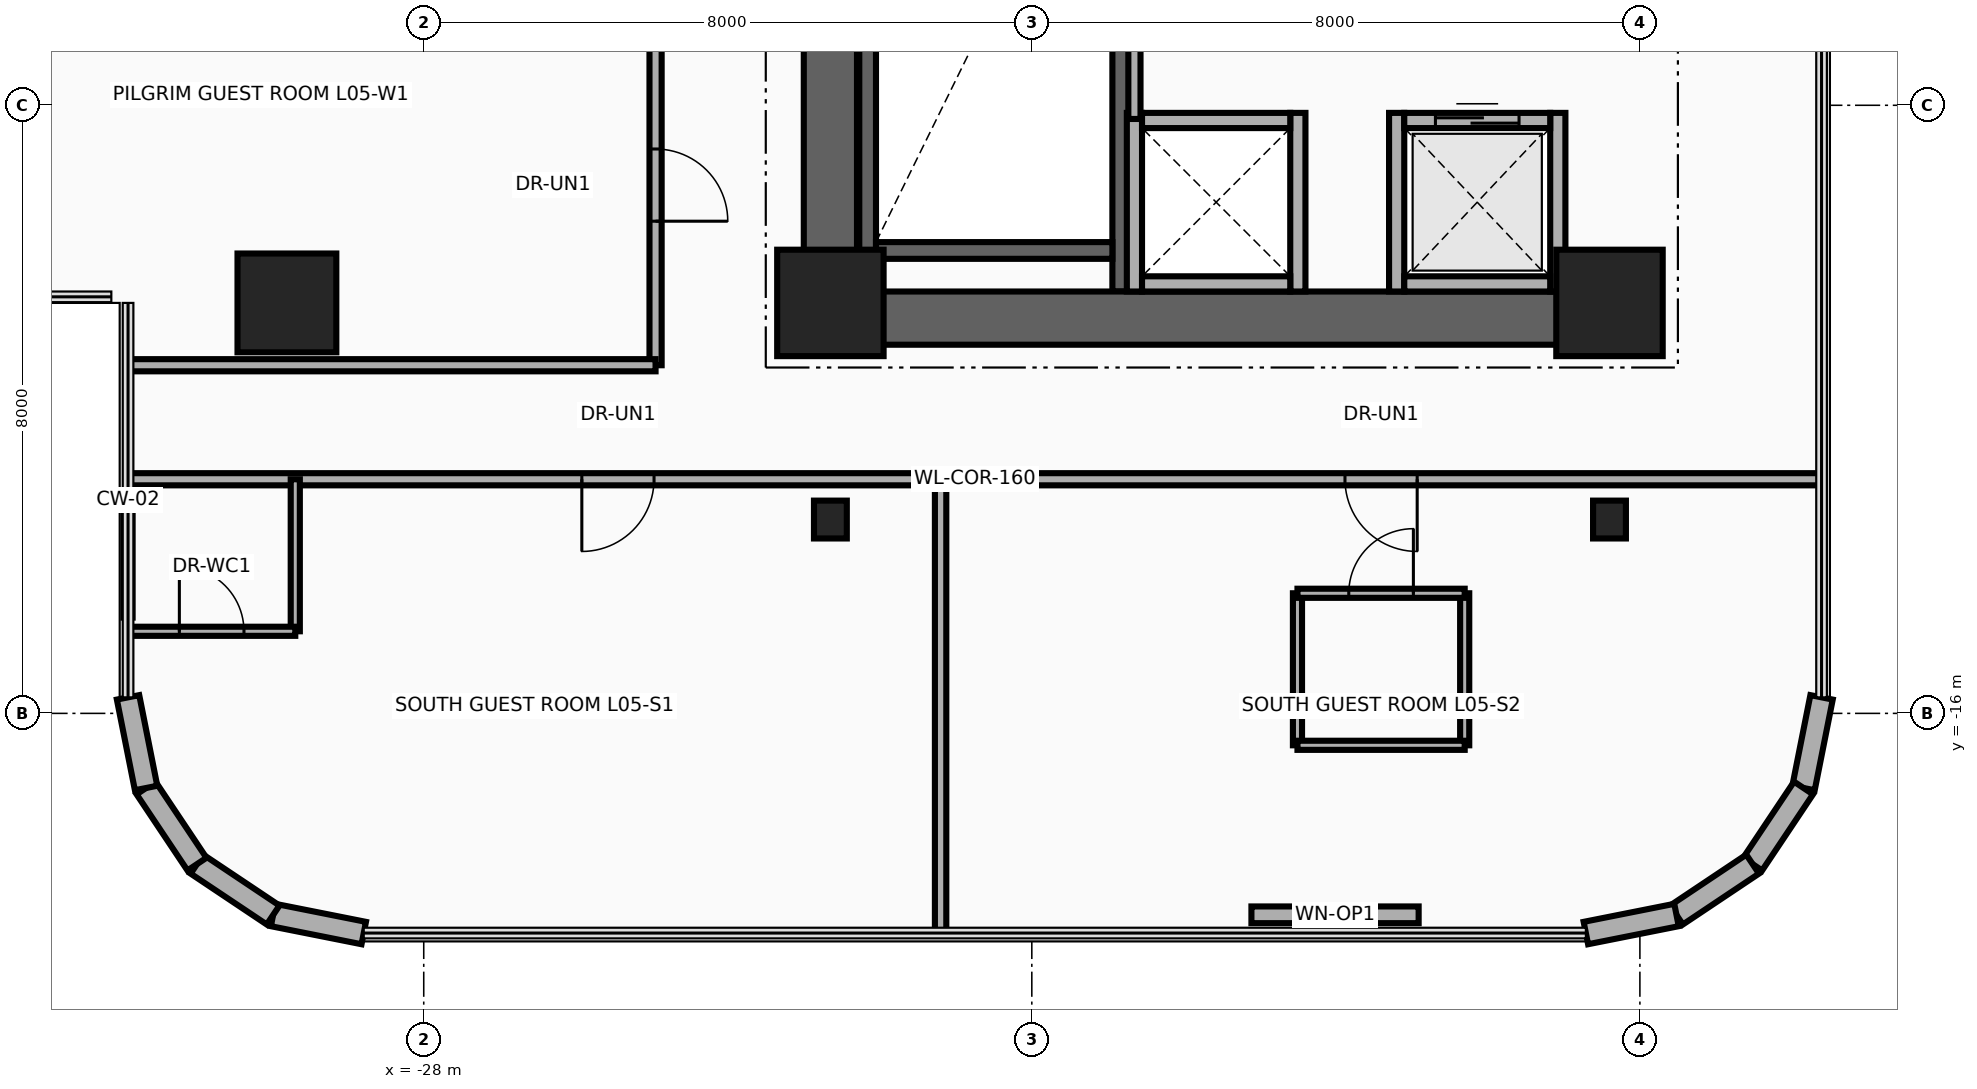
"""IFC4 building model, lengths in metres.
Left out: names, types, materials, properties, quantities, classifications, styles, units other than length and angle.
Written with IfcOpenShell. Run it as: python <this file> out.ifc"""

import sys

from ifc_helpers import new_model, si_unit, direction, frame, frame_2d, origin, origin_2d, place, context, subcontext, project, spatial, rectangle, circle, i_section, extrude, source, transform, mapped, element, fill, save


model = new_model("IFC4")
c1 = context("Model", 3, precision=1e-05, world=origin(), true_north=direction((0.0, 1.0)))
c2 = subcontext(c1, "Body", "Model", "MODEL_VIEW")
j1 = project(units=[si_unit("LENGTHUNIT", "METRE"), si_unit("PLANEANGLEUNIT", "RADIAN")], contexts=[c1])
p1 = place(None, origin())
s1 = spatial("IfcSite", under=j1, at=p1, CompositionType="ELEMENT")
p2 = place(p1, origin())
s2 = spatial("IfcBuilding", under=s1, at=p2, CompositionType="ELEMENT")
p3 = place(p2, frame((0.0, 0.0, 26.0)))
s3 = spatial("IfcBuildingStorey", under=s2, at=p3, CompositionType="ELEMENT", Elevation=26.0)
for number, where, z_axis, x_axis in (
    (1, (-22.16, -10.45, 0.0), (0.0, 0.0, 1.0), (0.0, 1.0, 0.0)),
    (2, (-18.83, -10.45, 0.0), (0.0, 0.0, 1.0), (0.0, 1.0, 0.0)),
):
    element("IfcWall", number, at=place(p3, frame(where, z_axis=z_axis, x_axis=x_axis)), inside=s3, PredefinedType="SHEAR", context=c2, shape_type="SweptSolid", body=[
        extrude(rectangle(XDim=8.67, YDim=0.22, at=frame_2d((4.335, 0.0))), origin(), (0.0, 0.0, 1.0), 3.46),
    ])
p4 = place(p3, frame((-22.05, -9.91, 0.0), z_axis=(0.0, 0.0, 1.0), x_axis=(1.0, 0.0, 0.0)))
e3 = element("IfcWall", 3, at=p4, inside=s3, PredefinedType="SHEAR", context=c2, shape_type="SweptSolid", body=[
    extrude(rectangle(XDim=3.11, YDim=0.22, at=frame_2d((1.555, 0.0))), origin(), (0.0, 0.0, 1.0), 3.46),
])
p5 = place(p3, frame((-22.65, -11.15, 0.0), z_axis=(0.0, 0.0, 1.0), x_axis=(0.0, 1.0, 0.0)))
e4 = element("IfcWall", 4, at=p5, inside=s3, PredefinedType="SHEAR", context=c2, shape_type="SweptSolid", body=[
    extrude(rectangle(XDim=22.3, YDim=0.7, at=frame_2d((11.15, 0.0))), origin(), (0.0, 0.0, 1.0), 3.46),
])
p6 = place(p3, frame((-22.65, -10.8, 0.0), z_axis=(0.0, 0.0, 1.0), x_axis=(1.0, 0.0, 0.0)))
e5 = element("IfcWall", 5, at=p6, inside=s3, PredefinedType="SHEAR", context=c2, shape_type="SweptSolid", body=[
    extrude(rectangle(XDim=10.25, YDim=0.7, at=frame_2d((5.125, 0.0))), origin(), (0.0, 0.0, 1.0), 3.46),
])
m1 = source(origin(), c2, "Body", "SweptSolid", [
    extrude(circle(Radius=0.65, at=origin_2d()), origin(), (0.0, 0.0, 1.0), 3.7),
])
p7 = place(p3, frame((-29.8, -10.6, 0.0), z_axis=(0.0, 0.0, 1.0), x_axis=(1.0, 0.0, 0.0)))
e6 = element("IfcColumn", 6, at=p7, inside=s3, PredefinedType="COLUMN", context=c2, shape_type="MappedRepresentation", body=[
    mapped(m1, transform((0.0, 0.0, 0.0), x_axis=(1.0, 0.0, 0.0), y_axis=(0.0, 1.0, 0.0), z_axis=(0.0, 0.0, 1.0), scale=1.0)),
])
m2 = source(origin(), c2, "Body", "SweptSolid", [
    extrude(rectangle(XDim=1.4, YDim=1.4, at=origin_2d()), origin(), (0.0, 0.0, 1.0), 3.7),
])
for number, where, z_axis, x_axis in (
    (7, (-22.65, -10.6, 0.0), (0.0, 0.0, 1.0), (1.0, 0.0, 0.0)),
    (8, (-12.4, -10.6, 0.0), (0.0, 0.0, 1.0), (1.0, 0.0, 0.0)),
):
    element("IfcColumn", number, at=place(p3, frame(where, z_axis=z_axis, x_axis=x_axis)), inside=s3, PredefinedType="COLUMN", context=c2, shape_type="MappedRepresentation", body=[
        mapped(m2, transform((0.0, 0.0, 0.0), x_axis=(1.0, 0.0, 0.0), y_axis=(0.0, 1.0, 0.0), z_axis=(0.0, 0.0, 1.0), scale=1.0)),
    ])
m3 = source(origin(), c2, "Body", "SweptSolid", [
    extrude(i_section(OverallWidth=0.432, OverallDepth=0.498, WebThickness=0.056, FlangeThickness=0.089, at=origin_2d()), origin(), (0.0, 0.0, 1.0), 3.7),
])
for number, where, z_axis, x_axis in (
    (9, (-22.65, -13.45, 0.0), (0.0, 0.0, 1.0), (1.0, 0.0, 0.0)),
    (10, (-12.4, -13.45, 0.0), (0.0, 0.0, 1.0), (1.0, 0.0, 0.0)),
):
    element("IfcColumn", number, at=place(p3, frame(where, z_axis=z_axis, x_axis=x_axis)), inside=s3, PredefinedType="COLUMN", context=c2, shape_type="MappedRepresentation", body=[
        mapped(m3, transform((0.0, 0.0, 0.0), x_axis=(1.0, 0.0, 0.0), y_axis=(0.0, 1.0, 0.0), z_axis=(0.0, 0.0, 1.0), scale=1.0)),
    ])
p8 = place(p3, frame((-9.61, -15.789, 0.0), z_axis=(0.0, 0.0, 1.0), x_axis=(-0.194996050505, -0.980804027463, 0.0)))
e11 = element("IfcWall", 11, at=p8, inside=s3, PredefinedType="SOLIDWALL", context=c2, shape_type="SweptSolid", body=[
    extrude(rectangle(XDim=1.216, YDim=0.3, at=frame_2d((0.608, 0.0))), origin(), (0.0, 0.0, 1.0), 3.46),
])
for number, where, z_axis, x_axis in (
    (12, (-9.847, -16.982, 0.0), (0.0, 0.0, 1.0), (-0.556, -0.831, 0.0)),
    (13, (-10.517, -17.983, 0.0), (0.0, 0.0, 1.0), (-0.831, -0.556, 0.0)),
):
    element("IfcWall", number, at=place(p3, frame(where, z_axis=z_axis, x_axis=x_axis)), inside=s3, PredefinedType="SOLIDWALL", context=c2, shape_type="SweptSolid", body=[
        extrude(rectangle(XDim=1.205, YDim=0.3, at=frame_2d((0.603, 0.0))), origin(), (0.0, 0.0, 1.0), 3.46),
    ])
p9 = place(p3, frame((-11.518, -18.653, 0.0), z_axis=(0.0, 0.0, 1.0), x_axis=(-0.980804027463, -0.194996050505, 0.0)))
e14 = element("IfcWall", 14, at=p9, inside=s3, PredefinedType="SOLIDWALL", context=c2, shape_type="SweptSolid", body=[
    extrude(rectangle(XDim=1.216, YDim=0.3, at=frame_2d((0.608, 0.0))), origin(), (0.0, 0.0, 1.0), 3.46),
])
p10 = place(p3, frame((-14.911, -18.65, 0.0), z_axis=(0.0, 0.0, 1.0), x_axis=(-1.0, 0.0, 0.0)))
e15 = element("IfcWall", 15, at=p10, inside=s3, PredefinedType="SOLIDWALL", context=c2, shape_type="SweptSolid", body=[
    extrude(rectangle(XDim=2.2, YDim=0.22, at=frame_2d((1.1, 0.0))), origin(), (0.0, 0.0, 1.0), 3.46),
])
p11 = place(p10, frame((0.65, 0.0, 0.95)))
e16 = element("IfcOpeningElement", 16, at=p11, cuts=e15, PredefinedType="OPENING", context=c2, shape_type="SweptSolid", body=[
    extrude(rectangle(XDim=0.9, YDim=1.3, at=frame_2d((0.45, 0.65))), frame((0.0, 0.125, 0.0), z_axis=(0.0, -1.0, 0.0), x_axis=(1.0, 0.0, 0.0)), (0.0, 0.0, 1.0), 0.25),
])
p12 = place(p3, frame((-28.789, -18.89, 0.0), z_axis=(0.0, 0.0, 1.0), x_axis=(-0.980804027463, 0.194996050505, 0.0)))
e17 = element("IfcWall", 17, at=p12, inside=s3, PredefinedType="SOLIDWALL", context=c2, shape_type="SweptSolid", body=[
    extrude(rectangle(XDim=1.216, YDim=0.3, at=frame_2d((0.608, 0.0))), origin(), (0.0, 0.0, 1.0), 3.46),
])
for number, where, z_axis, x_axis in (
    (18, (-29.982, -18.653, 0.0), (0.0, 0.0, 1.0), (-0.831, 0.556, 0.0)),
    (19, (-30.983, -17.983, 0.0), (0.0, 0.0, 1.0), (-0.556, 0.831, 0.0)),
):
    element("IfcWall", number, at=place(p3, frame(where, z_axis=z_axis, x_axis=x_axis)), inside=s3, PredefinedType="SOLIDWALL", context=c2, shape_type="SweptSolid", body=[
        extrude(rectangle(XDim=1.205, YDim=0.3, at=frame_2d((0.603, 0.0))), origin(), (0.0, 0.0, 1.0), 3.46),
    ])
p13 = place(p3, frame((-31.653, -16.982, 0.0), z_axis=(0.0, 0.0, 1.0), x_axis=(-0.194996050505, 0.980804027463, 0.0)))
e20 = element("IfcWall", 20, at=p13, inside=s3, PredefinedType="SOLIDWALL", context=c2, shape_type="SweptSolid", body=[
    extrude(rectangle(XDim=1.216, YDim=0.3, at=frame_2d((0.608, 0.0))), origin(), (0.0, 0.0, 1.0), 3.46),
])
for number, where, z_axis, x_axis in (
    (21, (-15.2, -10.45, 0.0), (0.0, 0.0, 1.0), (0.0, 1.0, 0.0)),
    (22, (-13.08, -10.45, 0.0), (0.0, 0.0, 1.0), (0.0, 1.0, 0.0)),
):
    element("IfcWall", number, at=place(p3, frame(where, z_axis=z_axis, x_axis=x_axis)), inside=s3, PredefinedType="MOVABLE", context=c2, shape_type="SweptSolid", body=[
        extrude(rectangle(XDim=2.35, YDim=0.2, at=frame_2d((1.175, 0.0))), origin(), (0.0, 0.0, 1.0), 2.583),
    ])
p14 = place(p3, frame((-15.1, -10.35, 0.0), z_axis=(0.0, 0.0, 1.0), x_axis=(1.0, 0.0, 0.0)))
e23 = element("IfcWall", 23, at=p14, inside=s3, PredefinedType="MOVABLE", context=c2, shape_type="SweptSolid", body=[
    extrude(rectangle(XDim=1.92, YDim=0.2, at=frame_2d((0.96, 0.0))), origin(), (0.0, 0.0, 1.0), 2.583),
])
p15 = place(p3, frame((-15.1, -8.2, 0.0), z_axis=(0.0, 0.0, 1.0), x_axis=(1.0, 0.0, 0.0)))
e24 = element("IfcWall", 24, at=p15, inside=s3, PredefinedType="MOVABLE", context=c2, shape_type="SweptSolid", body=[
    extrude(rectangle(XDim=1.92, YDim=0.2, at=frame_2d((0.96, 0.0))), origin(), (0.0, 0.0, 1.0), 3.46),
])
p16 = place(p15, frame((0.41, 0.0, 0.0)))
e25 = element("IfcOpeningElement", 25, at=p16, cuts=e24, PredefinedType="OPENING", context=c2, shape_type="SweptSolid", body=[
    extrude(rectangle(XDim=1.1, YDim=2.1, at=frame_2d((0.55, 1.05))), frame((0.0, 0.115, 0.0), z_axis=(0.0, -1.0, 0.0), x_axis=(1.0, 0.0, 0.0)), (0.0, 0.0, 1.0), 0.23),
])
for number, where, z_axis, x_axis in (
    (26, (-18.65, -10.45, 0.0), (0.0, 0.0, 1.0), (0.0, 1.0, 0.0)),
    (27, (-16.5, -10.45, 0.0), (0.0, 0.0, 1.0), (0.0, 1.0, 0.0)),
):
    element("IfcWall", number, at=place(p3, frame(where, z_axis=z_axis, x_axis=x_axis)), inside=s3, PredefinedType="MOVABLE", context=c2, shape_type="SweptSolid", body=[
        extrude(rectangle(XDim=2.35, YDim=0.2, at=frame_2d((1.175, 0.0))), origin(), (0.0, 0.0, 1.0), 2.583),
    ])
p17 = place(p3, frame((-18.55, -10.35, 0.0), z_axis=(0.0, 0.0, 1.0), x_axis=(1.0, 0.0, 0.0)))
e28 = element("IfcWall", 28, at=p17, inside=s3, PredefinedType="MOVABLE", context=c2, shape_type="SweptSolid", body=[
    extrude(rectangle(XDim=1.95, YDim=0.2, at=frame_2d((0.975, 0.0))), origin(), (0.0, 0.0, 1.0), 2.583),
])
p18 = place(p3, frame((-18.55, -8.2, 0.0), z_axis=(0.0, 0.0, 1.0), x_axis=(1.0, 0.0, 0.0)))
e29 = element("IfcWall", 29, at=p18, inside=s3, PredefinedType="MOVABLE", context=c2, shape_type="SweptSolid", body=[
    extrude(rectangle(XDim=1.95, YDim=0.2, at=frame_2d((0.975, 0.0))), origin(), (0.0, 0.0, 1.0), 3.46),
])
p19 = place(p3, frame((-18.65, -8.18, 0.0), z_axis=(0.0, 0.0, 1.0), x_axis=(0.0, 1.0, 0.0)))
e30 = element("IfcWall", 30, at=p19, inside=s3, PredefinedType="PARTITIONING", context=c2, shape_type="SweptSolid", body=[
    extrude(rectangle(XDim=1.56, YDim=0.16, at=frame_2d((0.78, 0.0))), origin(), (0.0, 0.0, 1.0), 3.46),
])
p20 = place(p3, frame((-24.95, -11.42, 0.0), z_axis=(0.0, 0.0, 1.0), x_axis=(0.0, 1.0, 0.0)))
e31 = element("IfcWall", 31, at=p20, inside=s3, PredefinedType="PARTITIONING", context=c2, shape_type="SweptSolid", body=[
    extrude(rectangle(XDim=20.22, YDim=0.16, at=frame_2d((10.11, 0.0))), origin(), (0.0, 0.0, 1.0), 2.583),
])
p21 = place(p20, frame((1.895, 0.0, 0.0)))
e32 = element("IfcOpeningElement", 32, at=p21, cuts=e31, PredefinedType="OPENING", context=c2, shape_type="SweptSolid", body=[
    extrude(rectangle(XDim=0.95, YDim=2.15, at=frame_2d((0.475, 1.075))), frame((0.0, 0.095, 0.0), z_axis=(0.0, -1.0, 0.0), x_axis=(1.0, 0.0, 0.0)), (0.0, 0.0, 1.0), 0.19),
])
p22 = place(p20, frame((8.635, 0.0, 0.0)))
e33 = element("IfcOpeningElement", 33, at=p22, cuts=e31, PredefinedType="OPENING", context=c2, shape_type="SweptSolid", body=[
    extrude(rectangle(XDim=0.95, YDim=2.15, at=frame_2d((0.475, 1.075))), frame((0.0, 0.095, 0.0), z_axis=(0.0, -1.0, 0.0), x_axis=(1.0, 0.0, 0.0)), (0.0, 0.0, 1.0), 0.19),
])
p23 = place(p20, frame((17.375, 0.0, 0.0)))
e34 = element("IfcOpeningElement", 34, at=p23, cuts=e31, PredefinedType="OPENING", context=c2, shape_type="SweptSolid", body=[
    extrude(rectangle(XDim=0.95, YDim=2.15, at=frame_2d((0.475, 1.075))), frame((0.0, 0.095, 0.0), z_axis=(0.0, -1.0, 0.0), x_axis=(1.0, 0.0, 0.0)), (0.0, 0.0, 1.0), 0.19),
])
p24 = place(p3, frame((-31.89, -12.92, 0.0), z_axis=(0.0, 0.0, 1.0), x_axis=(1.0, 0.0, 0.0)))
e35 = element("IfcWall", 35, at=p24, inside=s3, PredefinedType="PARTITIONING", context=c2, shape_type="SweptSolid", body=[
    extrude(rectangle(XDim=22.28, YDim=0.16, at=frame_2d((11.14, 0.0))), origin(), (0.0, 0.0, 1.0), 2.834),
])
p25 = place(p24, frame((5.97, 0.0, 0.0)))
e36 = element("IfcOpeningElement", 36, at=p25, cuts=e35, PredefinedType="OPENING", context=c2, shape_type="SweptSolid", body=[
    extrude(rectangle(XDim=0.95, YDim=2.15, at=frame_2d((0.475, 1.075))), frame((0.0, 0.095, 0.0), z_axis=(0.0, -1.0, 0.0), x_axis=(1.0, 0.0, 0.0)), (0.0, 0.0, 1.0), 0.19),
])
p26 = place(p24, frame((16.01, 0.0, 0.0)))
e37 = element("IfcOpeningElement", 37, at=p26, cuts=e35, PredefinedType="OPENING", context=c2, shape_type="SweptSolid", body=[
    extrude(rectangle(XDim=0.95, YDim=2.15, at=frame_2d((0.475, 1.075))), frame((0.0, 0.095, 0.0), z_axis=(0.0, -1.0, 0.0), x_axis=(1.0, 0.0, 0.0)), (0.0, 0.0, 1.0), 0.19),
])
p27 = place(p3, frame((-21.2, -18.89, 0.0), z_axis=(0.0, 0.0, 1.0), x_axis=(0.0, 1.0, 0.0)))
e38 = element("IfcWall", 38, at=p27, inside=s3, PredefinedType="PARTITIONING", context=c2, shape_type="SweptSolid", body=[
    extrude(rectangle(XDim=5.97, YDim=0.15, at=frame_2d((2.985, 0.0))), origin(), (0.0, 0.0, 1.0), 2.896),
])
p28 = place(p3, frame((-29.69, -14.92, 0.0), z_axis=(0.0, 0.0, 1.0), x_axis=(0.0, 1.0, 0.0)))
e39 = element("IfcWall", 39, at=p28, inside=s3, PredefinedType="PARTITIONING", context=c2, shape_type="SweptSolid", body=[
    extrude(rectangle(XDim=2.0, YDim=0.12, at=frame_2d((1.0, 0.0))), origin(), (0.0, 0.0, 1.0), 3.46),
])
p29 = place(p3, frame((-31.89, -14.92, 0.0), z_axis=(0.0, 0.0, 1.0), x_axis=(1.0, 0.0, 0.0)))
e40 = element("IfcWall", 40, at=p29, inside=s3, PredefinedType="PARTITIONING", context=c2, shape_type="SweptSolid", body=[
    extrude(rectangle(XDim=2.2, YDim=0.12, at=frame_2d((1.1, 0.0))), origin(), (0.0, 0.0, 1.0), 3.46),
])
p30 = place(p29, frame((0.675, 0.0, 0.0)))
e41 = element("IfcOpeningElement", 41, at=p30, cuts=e40, PredefinedType="OPENING", context=c2, shape_type="SweptSolid", body=[
    extrude(rectangle(XDim=0.85, YDim=2.1, at=frame_2d((0.425, 1.05))), frame((0.0, 0.075, 0.0), z_axis=(0.0, -1.0, 0.0), x_axis=(1.0, 0.0, 0.0)), (0.0, 0.0, 1.0), 0.15),
])
p31 = place(p3, frame((-31.89, -14.74, 0.0), z_axis=(0.0, 0.0, 1.0), x_axis=(0.0, 1.0, 0.0)))
e42 = element("IfcWall", 42, at=p31, inside=s3, PredefinedType="PARTITIONING", context=c2, shape_type="SweptSolid", body=[
    extrude(rectangle(XDim=1.62, YDim=0.12, at=frame_2d((0.81, 0.0))), origin(), (0.0, 0.0, 1.0), 3.46),
])
for number, where, z_axis, x_axis in (
    (43, (-16.505, -16.42, 0.0), (0.0, 0.0, 1.0), (0.0, 1.0, 0.0)),
    (44, (-14.305, -16.42, 0.0), (0.0, 0.0, 1.0), (0.0, 1.0, 0.0)),
):
    element("IfcWall", number, at=place(p3, frame(where, z_axis=z_axis, x_axis=x_axis)), inside=s3, PredefinedType="PARTITIONING", context=c2, shape_type="SweptSolid", body=[
        extrude(rectangle(XDim=2.0, YDim=0.12, at=frame_2d((1.0, 0.0))), origin(), (0.0, 0.0, 1.0), 3.46),
    ])
p32 = place(p3, frame((-16.505, -16.42, 0.0), z_axis=(0.0, 0.0, 1.0), x_axis=(1.0, 0.0, 0.0)))
e45 = element("IfcWall", 45, at=p32, inside=s3, PredefinedType="PARTITIONING", context=c2, shape_type="SweptSolid", body=[
    extrude(rectangle(XDim=2.2, YDim=0.12, at=frame_2d((1.1, 0.0))), origin(), (0.0, 0.0, 1.0), 3.46),
])
p33 = place(p3, frame((-16.505, -14.42, 0.0), z_axis=(0.0, 0.0, 1.0), x_axis=(1.0, 0.0, 0.0)))
e46 = element("IfcWall", 46, at=p33, inside=s3, PredefinedType="PARTITIONING", context=c2, shape_type="SweptSolid", body=[
    extrude(rectangle(XDim=2.2, YDim=0.12, at=frame_2d((1.1, 0.0))), origin(), (0.0, 0.0, 1.0), 3.46),
])
p34 = place(p33, frame((0.675, 0.0, 0.0)))
e47 = element("IfcOpeningElement", 47, at=p34, cuts=e46, PredefinedType="OPENING", context=c2, shape_type="SweptSolid", body=[
    extrude(rectangle(XDim=0.85, YDim=2.1, at=frame_2d((0.425, 1.05))), frame((0.0, 0.075, 0.0), z_axis=(0.0, -1.0, 0.0), x_axis=(1.0, 0.0, 0.0)), (0.0, 0.0, 1.0), 0.15),
])
p35 = place(p3, frame((-31.89, -11.42, 0.0), z_axis=(0.0, 0.0, 1.0), x_axis=(1.0, 0.0, 0.0)))
e48 = element("IfcWall", 48, at=p35, inside=s3, PredefinedType="PARTITIONING", context=c2, shape_type="SweptSolid", body=[
    extrude(rectangle(XDim=6.94, YDim=0.16, at=frame_2d((3.47, 0.0))), origin(), (0.0, 0.0, 1.0), 3.46),
])
p36 = place(p11, origin())
e49 = element("IfcWindow", 49, at=p36, inside=s3, PartitioningType="SINGLE_PANEL", PredefinedType="WINDOW", context=c2, shape_type="SweptSolid", body=[
    extrude(rectangle(XDim=0.9, YDim=1.3, at=frame_2d((0.45, 0.65))), frame((0.0, 0.03, 0.0), z_axis=(0.0, -1.0, 0.0), x_axis=(1.0, 0.0, 0.0)), (0.0, 0.0, 1.0), 0.06),
])
fill(e16, e49)
p37 = place(p16, origin())
e50 = element("IfcDoor", 50, at=p37, inside=s3, OperationType="DOUBLE_DOOR_SLIDING", PredefinedType="DOOR", context=c2, shape_type="SweptSolid", body=[
    extrude(rectangle(XDim=1.1, YDim=2.1, at=frame_2d((0.55, 1.05))), frame((0.0, 0.025, 0.0), z_axis=(0.0, -1.0, 0.0), x_axis=(1.0, 0.0, 0.0)), (0.0, 0.0, 1.0), 0.05),
])
fill(e25, e50)
p38 = place(p21, frame((0.95, 0.0, 0.0), z_axis=(0.0, 0.0, 1.0), x_axis=(-1.0, 0.0, 0.0)))
e51 = element("IfcDoor", 51, at=p38, inside=s3, OperationType="SINGLE_SWING_LEFT", PredefinedType="DOOR", context=c2, shape_type="SweptSolid", body=[
    extrude(rectangle(XDim=0.95, YDim=2.15, at=frame_2d((0.475, 1.075))), frame((0.0, 0.025, 0.0), z_axis=(0.0, -1.0, 0.0), x_axis=(1.0, 0.0, 0.0)), (0.0, 0.0, 1.0), 0.05),
])
fill(e32, e51)
p39 = place(p25, frame((0.95, 0.0, 0.0), z_axis=(0.0, 0.0, 1.0), x_axis=(-1.0, 0.0, 0.0)))
e52 = element("IfcDoor", 52, at=p39, inside=s3, OperationType="SINGLE_SWING_LEFT", PredefinedType="DOOR", context=c2, shape_type="SweptSolid", body=[
    extrude(rectangle(XDim=0.95, YDim=2.15, at=frame_2d((0.475, 1.075))), frame((0.0, 0.025, 0.0), z_axis=(0.0, -1.0, 0.0), x_axis=(1.0, 0.0, 0.0)), (0.0, 0.0, 1.0), 0.05),
])
fill(e36, e52)
p40 = place(p30, origin())
e53 = element("IfcDoor", 53, at=p40, inside=s3, OperationType="SINGLE_SWING_RIGHT", PredefinedType="DOOR", context=c2, shape_type="SweptSolid", body=[
    extrude(rectangle(XDim=0.85, YDim=2.1, at=frame_2d((0.425, 1.05))), frame((0.0, 0.025, 0.0), z_axis=(0.0, -1.0, 0.0), x_axis=(1.0, 0.0, 0.0)), (0.0, 0.0, 1.0), 0.05),
])
fill(e41, e53)
p41 = place(p26, frame((0.95, 0.0, 0.0), z_axis=(0.0, 0.0, 1.0), x_axis=(-1.0, 0.0, 0.0)))
e54 = element("IfcDoor", 54, at=p41, inside=s3, OperationType="SINGLE_SWING_LEFT", PredefinedType="DOOR", context=c2, shape_type="SweptSolid", body=[
    extrude(rectangle(XDim=0.95, YDim=2.15, at=frame_2d((0.475, 1.075))), frame((0.0, 0.025, 0.0), z_axis=(0.0, -1.0, 0.0), x_axis=(1.0, 0.0, 0.0)), (0.0, 0.0, 1.0), 0.05),
])
fill(e37, e54)
p42 = place(p34, origin())
e55 = element("IfcDoor", 55, at=p42, inside=s3, OperationType="SINGLE_SWING_RIGHT", PredefinedType="DOOR", context=c2, shape_type="SweptSolid", body=[
    extrude(rectangle(XDim=0.85, YDim=2.1, at=frame_2d((0.425, 1.05))), frame((0.0, 0.025, 0.0), z_axis=(0.0, -1.0, 0.0), x_axis=(1.0, 0.0, 0.0)), (0.0, 0.0, 1.0), 0.05),
])
fill(e47, e55)
save(model, sys.argv[1])
